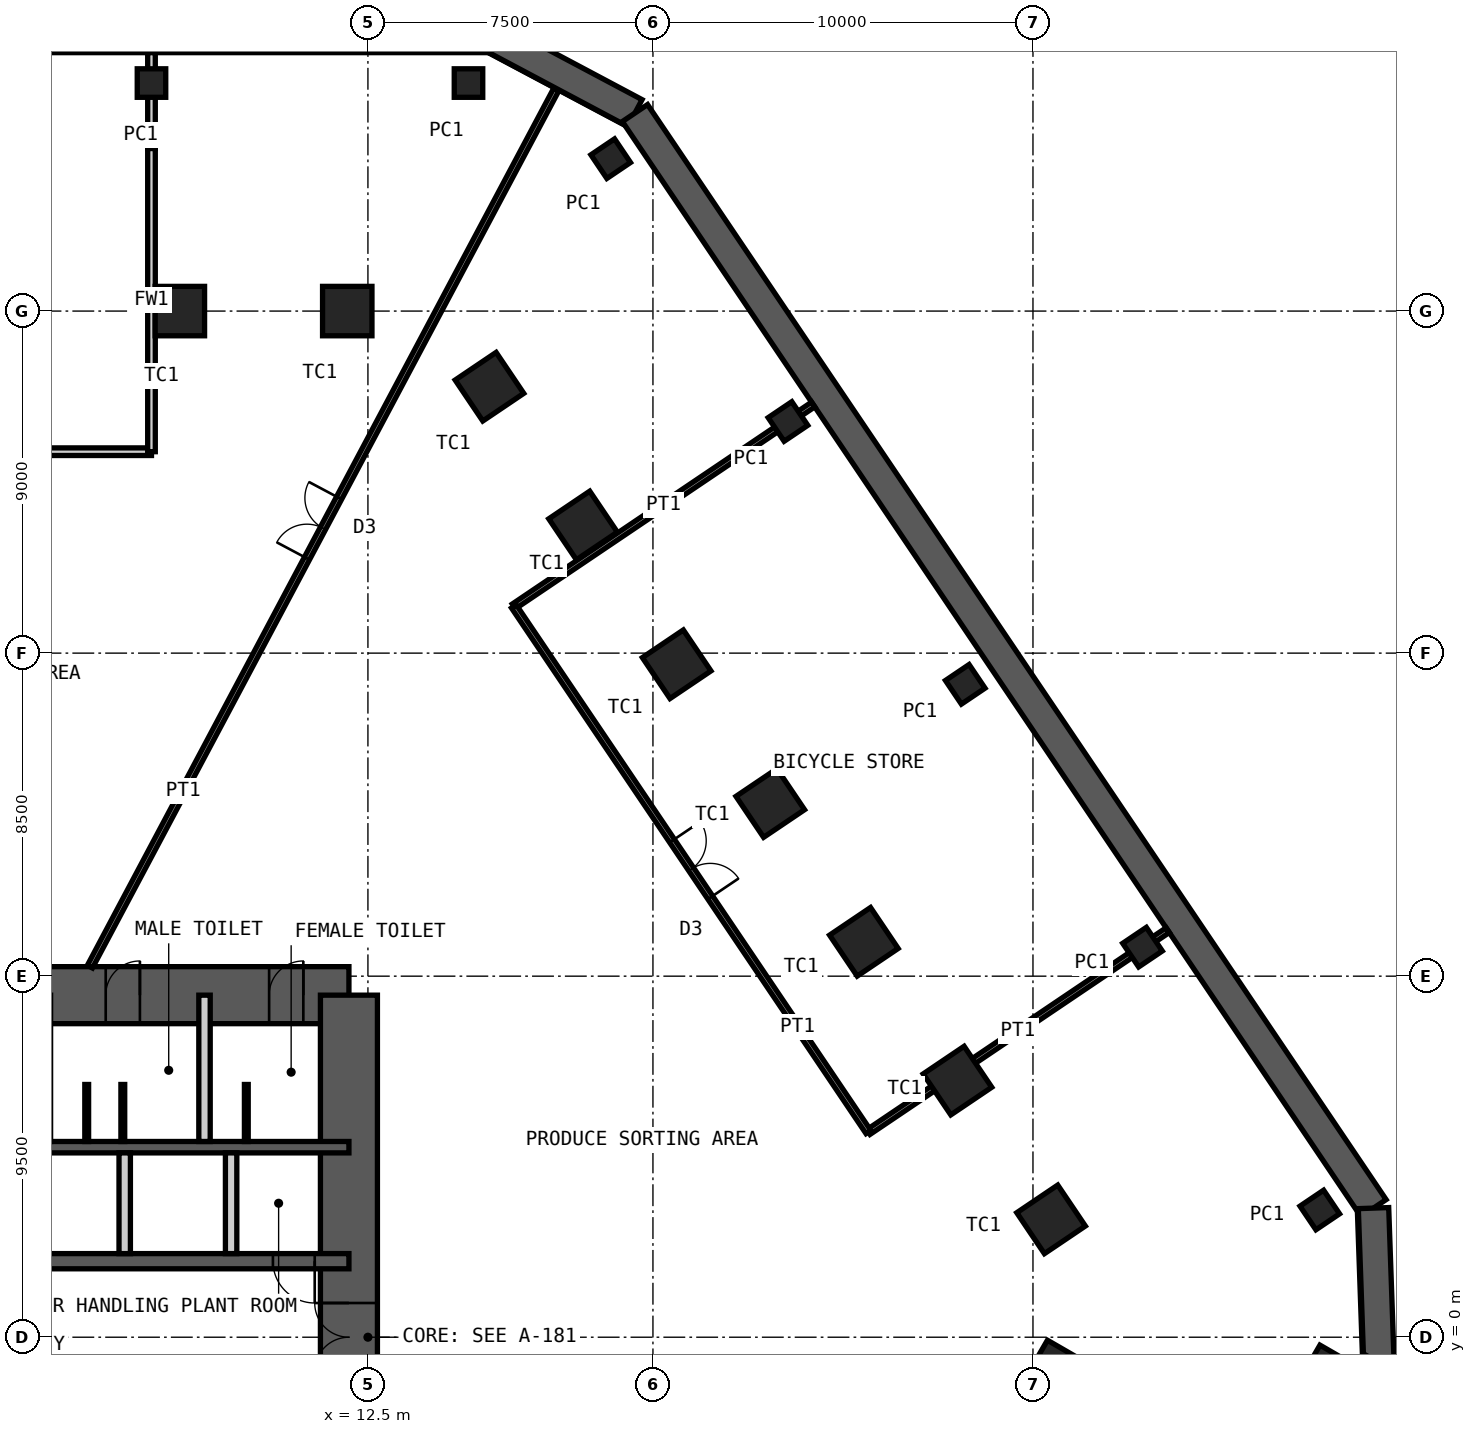
"""IFC4 building model, lengths in metres.
Left out: names, types, materials, properties, quantities, classifications, styles, units other than length and angle.
Written with IfcOpenShell. Run it as: python <this file> out.ifc"""

import sys

from ifc_helpers import new_model, si_unit, direction, frame, frame_2d, origin, origin_2d, place, context, subcontext, project, spatial, rectangle, hollow_rectangle, extrude, element, fill, save


model = new_model("IFC4")
c1 = context("Model", 3, precision=1e-05, world=origin(), true_north=direction((0.0, 1.0)))
c2 = subcontext(c1, "Body", "Model", "MODEL_VIEW")
j1 = project(units=[si_unit("LENGTHUNIT", "METRE"), si_unit("PLANEANGLEUNIT", "RADIAN")], contexts=[c1])
p1 = place(None, origin())
s1 = spatial("IfcSite", under=j1, at=p1, CompositionType="ELEMENT")
p2 = place(p1, origin())
s2 = spatial("IfcBuilding", under=s1, at=p2, CompositionType="ELEMENT")
p3 = place(p2, frame((0.0, 0.0, -6.0)))
s3 = spatial("IfcBuildingStorey", under=s2, at=p3, CompositionType="ELEMENT", Elevation=-6.0)
p4 = place(p3, frame((-18.97, 34.2, 0.0), z_axis=(0.0, 0.0, 1.0), x_axis=(1.0, 0.0, 0.0)))
e1 = element("IfcWall", 1, at=p4, inside=s3, PredefinedType="SHEAR", context=c2, shape_type="SweptSolid", body=[
    extrude(rectangle(XDim=34.755, YDim=0.8, at=frame_2d((17.377, 0.0))), origin(), (0.0, 0.0, 1.0), 6.0),
])
p5 = place(p3, frame((15.784, 34.2, 0.0), z_axis=(0.0, 0.0, 1.0), x_axis=(0.882948599748, -0.469469669099, 0.0)))
e2 = element("IfcWall", 2, at=p5, inside=s3, PredefinedType="SHEAR", context=c2, shape_type="SweptSolid", body=[
    extrude(rectangle(XDim=4.238, YDim=0.8, at=frame_2d((2.119, 0.0))), origin(), (0.0, 0.0, 1.0), 6.0),
])
p6 = place(p3, frame((19.527, 32.21, 0.0), z_axis=(0.0, 0.0, 1.0), x_axis=(0.559192197891, -0.829038048474, 0.0)))
e3 = element("IfcWall", 3, at=p6, inside=s3, PredefinedType="SHEAR", context=c2, shape_type="SweptSolid", body=[
    extrude(rectangle(XDim=34.755, YDim=0.8, at=frame_2d((17.377, 0.0))), origin(), (0.0, 0.0, 1.0), 6.0),
])
p7 = place(p3, frame((38.961, 3.397, 0.0), z_axis=(0.0, 0.0, 1.0), x_axis=(0.034904306503, -0.999390659046, 0.0)))
e4 = element("IfcWall", 4, at=p7, inside=s3, PredefinedType="SHEAR", context=c2, shape_type="SweptSolid", body=[
    extrude(rectangle(XDim=4.071, YDim=0.8, at=frame_2d((2.035, 0.0))), origin(), (0.0, 0.0, 1.0), 6.0),
])
for number, where, z_axis, x_axis in (
    (5, (7.552, 27.0, 0.0), (0.0, 0.0, 1.0), (-1.0, 0.0, 0.0)),
    (6, (11.956, 27.0, 0.0), (0.0, 0.0, 1.0), (-1.0, 0.0, 0.0)),
    (7, (15.698, 25.01, 0.0), (0.0, 0.0, 1.0), (-0.559, 0.829, 0.0)),
    (8, (18.161, 21.359, 0.0), (0.0, 0.0, 1.0), (-0.559, 0.829, 0.0)),
    (9, (20.624, 17.707, 0.0), (0.0, 0.0, 1.0), (-0.559, 0.829, 0.0)),
    (10, (23.087, 14.056, 0.0), (0.0, 0.0, 1.0), (-0.559, 0.829, 0.0)),
    (11, (25.55, 10.404, 0.0), (0.0, 0.0, 1.0), (-0.559, 0.829, 0.0)),
    (12, (28.013, 6.752, 0.0), (0.0, 0.0, 1.0), (-0.559, 0.829, 0.0)),
    (13, (30.476, 3.101, 0.0), (0.0, 0.0, 1.0), (-0.559, 0.829, 0.0)),
    (14, (30.618, -0.967, 0.0), (0.0, 0.0, 1.0), (0.5, 0.866, 0.0)),
):
    element("IfcColumn", number, at=place(p3, frame(where, z_axis=z_axis, x_axis=x_axis)), inside=s3, PredefinedType="COLUMN", context=c2, shape_type="SweptSolid", body=[
        extrude(hollow_rectangle(XDim=1.3, YDim=1.3, WallThickness=0.1, at=origin_2d()), origin(), (0.0, 0.0, 1.0), 6.0),
    ])
for number, where, z_axis, x_axis in (
    (15, (6.805, 33.0, 0.0), (0.0, 0.0, 1.0), (-1.0, 0.0, 0.0)),
    (16, (18.888, 31.01, 0.0), (0.0, 0.0, 1.0), (-0.559, 0.829, 0.0)),
    (17, (23.553, 24.095, 0.0), (0.0, 0.0, 1.0), (-0.559, 0.829, 0.0)),
    (18, (28.218, 17.179, 0.0), (0.0, 0.0, 1.0), (-0.559, 0.829, 0.0)),
    (19, (32.883, 10.263, 0.0), (0.0, 0.0, 1.0), (-0.559, 0.829, 0.0)),
    (20, (37.689, -0.72, 0.0), (0.0, 0.0, 1.0), (0.5, 0.866, 0.0)),
    (21, (15.146, 33.0, 0.0), (0.0, 0.0, 1.0), (-1.0, 0.0, 0.0)),
    (22, (37.547, 3.348, 0.0), (0.0, 0.0, 1.0), (-0.559, 0.829, 0.0)),
):
    element("IfcColumn", number, at=place(p3, frame(where, z_axis=z_axis, x_axis=x_axis)), inside=s3, PredefinedType="COLUMN", context=c2, shape_type="SweptSolid", body=[
        extrude(hollow_rectangle(XDim=0.75, YDim=0.75, WallThickness=0.036, at=origin_2d()), origin(), (0.0, 0.0, 1.0), 6.0),
    ])
p8 = place(p3, frame((-12.0, 9.0, 0.0), z_axis=(0.0, 0.0, 1.0), x_axis=(1.0, 0.0, 0.0)))
e23 = element("IfcWall", 23, at=p8, inside=s3, PredefinedType="SHEAR", context=c2, shape_type="SweptSolid", body=[
    extrude(rectangle(XDim=24.0, YDim=1.5, at=frame_2d((12.0, 0.0))), origin(), (0.0, 0.0, 1.0), 6.0),
])
p9 = place(p8, frame((10.4, 0.0, 0.0)))
e24 = element("IfcOpeningElement", 24, at=p9, cuts=e23, PredefinedType="OPENING", context=c2, shape_type="SweptSolid", body=[
    extrude(rectangle(XDim=1.0, YDim=2.1, at=frame_2d((0.5, 1.05))), frame((0.0, 0.76, 0.0), z_axis=(0.0, -1.0, 0.0), x_axis=(1.0, 0.0, 0.0)), (0.0, 0.0, 1.0), 1.52),
])
p10 = place(p8, frame((17.6, 0.0, 0.0)))
e25 = element("IfcOpeningElement", 25, at=p10, cuts=e23, PredefinedType="OPENING", context=c2, shape_type="SweptSolid", body=[
    extrude(rectangle(XDim=0.9, YDim=2.1, at=frame_2d((0.45, 1.05))), frame((0.0, 0.76, 0.0), z_axis=(0.0, -1.0, 0.0), x_axis=(1.0, 0.0, 0.0)), (0.0, 0.0, 1.0), 1.52),
])
p11 = place(p8, frame((21.9, 0.0, 0.0)))
e26 = element("IfcOpeningElement", 26, at=p11, cuts=e23, PredefinedType="OPENING", context=c2, shape_type="SweptSolid", body=[
    extrude(rectangle(XDim=0.9, YDim=2.1, at=frame_2d((0.45, 1.05))), frame((0.0, 0.76, 0.0), z_axis=(0.0, -1.0, 0.0), x_axis=(1.0, 0.0, 0.0)), (0.0, 0.0, 1.0), 1.52),
])
p12 = place(p3, frame((12.0, -9.0, 0.0), z_axis=(0.0, 0.0, 1.0), x_axis=(0.0, 1.0, 0.0)))
e27 = element("IfcWall", 27, at=p12, inside=s3, PredefinedType="SHEAR", context=c2, shape_type="SweptSolid", body=[
    extrude(rectangle(XDim=18.0, YDim=1.5, at=frame_2d((9.0, 0.0))), origin(), (0.0, 0.0, 1.0), 6.0),
])
p13 = place(p12, frame((8.1, 0.0, 0.0)))
e28 = element("IfcOpeningElement", 28, at=p13, cuts=e27, PredefinedType="OPENING", context=c2, shape_type="SweptSolid", body=[
    extrude(rectangle(XDim=1.8, YDim=2.1, at=frame_2d((0.9, 1.05))), frame((0.0, 0.76, 0.0), z_axis=(0.0, -1.0, 0.0), x_axis=(1.0, 0.0, 0.0)), (0.0, 0.0, 1.0), 1.52),
])
p14 = place(p3, frame((-12.0, 5.0, 0.0), z_axis=(0.0, 0.0, 1.0), x_axis=(1.0, 0.0, 0.0)))
e29 = element("IfcWall", 29, at=p14, inside=s3, PredefinedType="SHEAR", context=c2, shape_type="SweptSolid", body=[
    extrude(rectangle(XDim=24.0, YDim=0.3, at=frame_2d((12.0, 0.0))), origin(), (0.0, 0.0, 1.0), 6.0),
])
p15 = place(p3, frame((-12.0, 2.0, 0.0), z_axis=(0.0, 0.0, 1.0), x_axis=(1.0, 0.0, 0.0)))
e30 = element("IfcWall", 30, at=p15, inside=s3, PredefinedType="SHEAR", context=c2, shape_type="SweptSolid", body=[
    extrude(rectangle(XDim=24.0, YDim=0.4, at=frame_2d((12.0, 0.0))), origin(), (0.0, 0.0, 1.0), 6.0),
])
p16 = place(p15, frame((2.4, 0.0, 0.0)))
e31 = element("IfcOpeningElement", 31, at=p16, cuts=e30, PredefinedType="OPENING", context=c2, shape_type="SweptSolid", body=[
    extrude(rectangle(XDim=1.1, YDim=2.1, at=frame_2d((0.55, 1.05))), frame((0.0, 0.21, 0.0), z_axis=(0.0, -1.0, 0.0), x_axis=(1.0, 0.0, 0.0)), (0.0, 0.0, 1.0), 0.42),
])
p17 = place(p15, frame((22.0, 0.0, 0.0)))
e32 = element("IfcOpeningElement", 32, at=p17, cuts=e30, PredefinedType="OPENING", context=c2, shape_type="SweptSolid", body=[
    extrude(rectangle(XDim=1.1, YDim=2.1, at=frame_2d((0.55, 1.05))), frame((0.0, 0.21, 0.0), z_axis=(0.0, -1.0, 0.0), x_axis=(1.0, 0.0, 0.0)), (0.0, 0.0, 1.0), 0.42),
])
p18 = place(p15, frame((10.15, 0.0, 0.0)))
e33 = element("IfcOpeningElement", 33, at=p18, cuts=e30, PredefinedType="OPENING", context=c2, shape_type="SweptSolid", body=[
    extrude(rectangle(XDim=1.0, YDim=2.1, at=frame_2d((0.5, 1.05))), frame((0.0, 0.21, 0.0), z_axis=(0.0, -1.0, 0.0), x_axis=(1.0, 0.0, 0.0)), (0.0, 0.0, 1.0), 0.42),
])
p19 = place(p15, frame((6.7, 0.0, 0.0)))
e34 = element("IfcOpeningElement", 34, at=p19, cuts=e30, PredefinedType="OPENING", context=c2, shape_type="SweptSolid", body=[
    extrude(rectangle(XDim=1.4, YDim=2.4, at=frame_2d((0.7, 1.2))), frame((0.0, 0.21, 0.0), z_axis=(0.0, -1.0, 0.0), x_axis=(1.0, 0.0, 0.0)), (0.0, 0.0, 1.0), 0.42),
])
p20 = place(p3, frame((8.2, 5.15, 0.0), z_axis=(0.0, 0.0, 1.0), x_axis=(0.0, 1.0, 0.0)))
e35 = element("IfcWall", 35, at=p20, inside=s3, PredefinedType="PARTITIONING", context=c2, shape_type="SweptSolid", body=[
    extrude(rectangle(XDim=3.85, YDim=0.3, at=frame_2d((1.925, 0.0))), origin(), (0.0, 0.0, 1.0), 5.78),
])
for number, where, z_axis, x_axis in (
    (36, (6.1, 2.2, 0.0), (0.0, 0.0, 1.0), (0.0, 1.0, 0.0)),
    (37, (8.9, 2.2, 0.0), (0.0, 0.0, 1.0), (0.0, 1.0, 0.0)),
):
    element("IfcWall", number, at=place(p3, frame(where, z_axis=z_axis, x_axis=x_axis)), inside=s3, PredefinedType="PARTITIONING", context=c2, shape_type="SweptSolid", body=[
        extrude(rectangle(XDim=2.65, YDim=0.3, at=frame_2d((1.325, 0.0))), origin(), (0.0, 0.0, 1.0), 5.78),
    ])
for number, where, z_axis, x_axis in (
    (38, (5.1, 5.15, 0.0), (0.0, 0.0, 1.0), (0.0, 1.0, 0.0)),
    (39, (6.05, 5.15, 0.0), (0.0, 0.0, 1.0), (0.0, 1.0, 0.0)),
    (40, (9.3, 5.15, 0.0), (0.0, 0.0, 1.0), (0.0, 1.0, 0.0)),
):
    element("IfcWall", number, at=place(p3, frame(where, z_axis=z_axis, x_axis=x_axis)), inside=s3, PredefinedType="PARTITIONING", context=c2, shape_type="SweptSolid", body=[
        extrude(rectangle(XDim=1.5, YDim=0.1, at=frame_2d((0.75, 0.0))), origin(), (0.0, 0.0, 1.0), 2.1),
    ])
p21 = place(p3, frame((6.805, 33.8, 0.0), z_axis=(0.0, 0.0, 1.0), x_axis=(0.0, -1.0, 0.0)))
e41 = element("IfcWall", 41, at=p21, inside=s3, PredefinedType="PARTITIONING", context=c2, shape_type="SweptSolid", body=[
    extrude(rectangle(XDim=0.78, YDim=0.2, at=frame_2d((0.39, 0.0))), origin(), (0.0, 0.0, 1.0), 5.75),
])
p22 = place(p3, frame((-9.879, 23.3, 0.0), z_axis=(0.0, 0.0, 1.0), x_axis=(1.0, 0.0, 0.0)))
e42 = element("IfcWall", 42, at=p22, inside=s3, PredefinedType="PARTITIONING", context=c2, shape_type="SweptSolid", body=[
    extrude(rectangle(XDim=16.684, YDim=0.2, at=frame_2d((8.342, 0.0))), origin(), (0.0, 0.0, 1.0), 5.75),
])
p23 = place(p22, frame((7.342, 0.0, 0.0)))
e43 = element("IfcOpeningElement", 43, at=p23, cuts=e42, PredefinedType="OPENING", context=c2, shape_type="SweptSolid", body=[
    extrude(rectangle(XDim=2.0, YDim=2.4, at=frame_2d((1.0, 1.2))), frame((0.0, 0.11, 0.0), z_axis=(0.0, -1.0, 0.0), x_axis=(1.0, 0.0, 0.0)), (0.0, 0.0, 1.0), 0.22),
])
p24 = place(p3, frame((24.216, 24.542, 0.0), z_axis=(0.0, 0.0, 1.0), x_axis=(-0.829037218051, -0.559193429045, 0.0)))
e44 = element("IfcWall", 44, at=p24, inside=s3, PredefinedType="PARTITIONING", context=c2, shape_type="SweptSolid", body=[
    extrude(rectangle(XDim=9.5, YDim=0.15, at=frame_2d((4.75, 0.0))), origin(), (0.0, 0.0, 1.0), 4.65),
])
p25 = place(p3, frame((33.546, 10.711, 0.0), z_axis=(0.0, 0.0, 1.0), x_axis=(-0.829037218051, -0.559193429045, 0.0)))
e45 = element("IfcWall", 45, at=p25, inside=s3, PredefinedType="PARTITIONING", context=c2, shape_type="SweptSolid", body=[
    extrude(rectangle(XDim=9.5, YDim=0.15, at=frame_2d((4.75, 0.0))), origin(), (0.0, 0.0, 1.0), 5.75),
])
p26 = place(p3, frame((16.341, 19.23, 0.0), z_axis=(0.0, 0.0, 1.0), x_axis=(0.559193597406, -0.829037104489, 0.0)))
e46 = element("IfcWall", 46, at=p26, inside=s3, PredefinedType="PARTITIONING", context=c2, shape_type="SweptSolid", body=[
    extrude(rectangle(XDim=16.684, YDim=0.15, at=frame_2d((8.342, 0.0))), origin(), (0.0, 0.0, 1.0), 5.75),
])
p27 = place(p26, frame((7.442, 0.0, 0.0)))
e47 = element("IfcOpeningElement", 47, at=p27, cuts=e46, PredefinedType="OPENING", context=c2, shape_type="SweptSolid", body=[
    extrude(rectangle(XDim=1.8, YDim=2.4, at=frame_2d((0.9, 1.2))), frame((0.0, 0.085, 0.0), z_axis=(0.0, -1.0, 0.0), x_axis=(1.0, 0.0, 0.0)), (0.0, 0.0, 1.0), 0.17),
])
p28 = place(p3, frame((5.184, 9.75, 0.0), z_axis=(0.0, 0.0, 1.0), x_axis=(0.469471208528, 0.882947781221, 0.0)))
e48 = element("IfcWall", 48, at=p28, inside=s3, PredefinedType="PARTITIONING", context=c2, shape_type="SweptSolid", body=[
    extrude(rectangle(XDim=26.134, YDim=0.15, at=frame_2d((13.067, 0.0))), origin(), (0.0, 0.0, 1.0), 5.75),
])
p29 = place(p28, frame((12.167, 0.0, 0.0)))
e49 = element("IfcOpeningElement", 49, at=p29, cuts=e48, PredefinedType="OPENING", context=c2, shape_type="SweptSolid", body=[
    extrude(rectangle(XDim=1.8, YDim=2.4, at=frame_2d((0.9, 1.2))), frame((0.0, 0.085, 0.0), z_axis=(0.0, -1.0, 0.0), x_axis=(1.0, 0.0, 0.0)), (0.0, 0.0, 1.0), 0.17),
])
p30 = place(p3, frame((6.805, 33.021, 0.0), z_axis=(0.0, 0.0, 1.0), x_axis=(0.0, -1.0, 0.0)))
e50 = element("IfcWall", 50, at=p30, inside=s3, PredefinedType="PARTITIONING", context=c2, shape_type="SweptSolid", body=[
    extrude(rectangle(XDim=1.743, YDim=0.2, at=frame_2d((0.872, 0.0))), origin(), (0.0, 0.0, 1.0), 4.65),
])
p31 = place(p3, frame((6.805, 31.277, 0.0), z_axis=(0.0, 0.0, 1.0), x_axis=(0.0, -1.0, 0.0)))
e51 = element("IfcWall", 51, at=p31, inside=s3, PredefinedType="PARTITIONING", context=c2, shape_type="SweptSolid", body=[
    extrude(rectangle(XDim=7.977, YDim=0.2, at=frame_2d((3.989, 0.0))), origin(), (0.0, 0.0, 1.0), 5.75),
])
p32 = place(p10, origin())
e52 = element("IfcDoor", 52, at=p32, inside=s3, OperationType="SINGLE_SWING_LEFT", PredefinedType="DOOR", context=c2, shape_type="SweptSolid", body=[
    extrude(rectangle(XDim=0.9, YDim=2.1, at=frame_2d((0.45, 1.05))), frame((0.0, 0.025, 0.0), z_axis=(0.0, -1.0, 0.0), x_axis=(1.0, 0.0, 0.0)), (0.0, 0.0, 1.0), 0.05),
])
fill(e25, e52)
p33 = place(p11, origin())
e53 = element("IfcDoor", 53, at=p33, inside=s3, OperationType="SINGLE_SWING_LEFT", PredefinedType="DOOR", context=c2, shape_type="SweptSolid", body=[
    extrude(rectangle(XDim=0.9, YDim=2.1, at=frame_2d((0.45, 1.05))), frame((0.0, 0.025, 0.0), z_axis=(0.0, -1.0, 0.0), x_axis=(1.0, 0.0, 0.0)), (0.0, 0.0, 1.0), 0.05),
])
fill(e26, e53)
p34 = place(p17, origin())
e54 = element("IfcDoor", 54, at=p34, inside=s3, OperationType="SINGLE_SWING_RIGHT", PredefinedType="DOOR", context=c2, shape_type="SweptSolid", body=[
    extrude(rectangle(XDim=1.1, YDim=2.1, at=frame_2d((0.55, 1.05))), frame((0.0, 0.025, 0.0), z_axis=(0.0, -1.0, 0.0), x_axis=(1.0, 0.0, 0.0)), (0.0, 0.0, 1.0), 0.05),
])
fill(e32, e54)
p35 = place(p13, origin())
e55 = element("IfcDoor", 55, at=p35, inside=s3, OperationType="DOUBLE_DOOR_DOUBLE_SWING", PredefinedType="DOOR", context=c2, shape_type="SweptSolid", body=[
    extrude(rectangle(XDim=1.8, YDim=2.1, at=frame_2d((0.9, 1.05))), frame((0.0, 0.025, 0.0), z_axis=(0.0, -1.0, 0.0), x_axis=(1.0, 0.0, 0.0)), (0.0, 0.0, 1.0), 0.05),
])
fill(e28, e55)
p36 = place(p27, origin())
e56 = element("IfcDoor", 56, at=p36, inside=s3, OperationType="DOUBLE_DOOR_DOUBLE_SWING", PredefinedType="DOOR", context=c2, shape_type="SweptSolid", body=[
    extrude(rectangle(XDim=1.8, YDim=2.4, at=frame_2d((0.9, 1.2))), frame((0.0, 0.025, 0.0), z_axis=(0.0, -1.0, 0.0), x_axis=(1.0, 0.0, 0.0)), (0.0, 0.0, 1.0), 0.05),
])
fill(e47, e56)
p37 = place(p29, origin())
e57 = element("IfcDoor", 57, at=p37, inside=s3, OperationType="DOUBLE_DOOR_DOUBLE_SWING", PredefinedType="DOOR", context=c2, shape_type="SweptSolid", body=[
    extrude(rectangle(XDim=1.8, YDim=2.4, at=frame_2d((0.9, 1.2))), frame((0.0, 0.025, 0.0), z_axis=(0.0, -1.0, 0.0), x_axis=(1.0, 0.0, 0.0)), (0.0, 0.0, 1.0), 0.05),
])
fill(e49, e57)
save(model, sys.argv[1])
